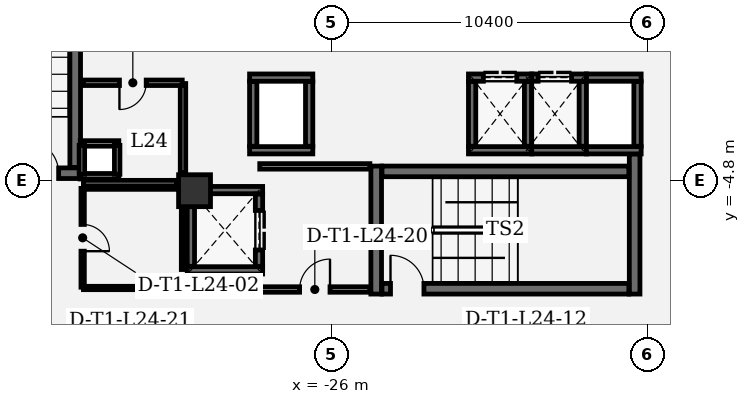
"""IFC4 building model, lengths in metres.
Left out: names, types, materials, properties, quantities, classifications, styles, units other than length and angle.
Written with IfcOpenShell. Run it as: python <this file> out.ifc"""

import sys

from ifc_helpers import new_model, si_unit, direction, frame, frame_2d, origin, origin_2d, place, context, subcontext, project, spatial, rectangle, extrude, element, fill, save


model = new_model("IFC4")
c1 = context("Model", 3, precision=1e-05, world=origin(), true_north=direction((0.0, 1.0)))
c2 = subcontext(c1, "Body", "Model", "MODEL_VIEW")
j1 = project(units=[si_unit("LENGTHUNIT", "METRE"), si_unit("PLANEANGLEUNIT", "RADIAN")], contexts=[c1])
p1 = place(None, origin())
s1 = spatial("IfcSite", under=j1, at=p1, CompositionType="ELEMENT")
p2 = place(p1, origin())
s2 = spatial("IfcBuilding", under=s1, at=p2, CompositionType="ELEMENT")
p3 = place(p2, frame((0.0, 0.0, 109.8)))
s3 = spatial("IfcBuildingStorey", under=s2, at=p3, CompositionType="ELEMENT", Elevation=109.8)
p4 = place(p3, frame((-30.5, -5.15, 0.0), z_axis=(0.0, 0.0, 1.0), x_axis=(1.0, 0.0, 0.0)))
e1 = element("IfcColumn", 1, at=p4, inside=s3, PredefinedType="COLUMN", context=c2, shape_type="SweptSolid", body=[
    extrude(rectangle(XDim=1.05, YDim=1.05, at=origin_2d()), origin(), (0.0, 0.0, 1.0), 4.05),
])
p5 = place(p3, frame((-24.525, -4.34, 0.0), z_axis=(0.0, 0.0, 1.0), x_axis=(0.0, -1.0, 0.0)))
e2 = element("IfcWall", 2, at=p5, inside=s3, PredefinedType="SHEAR", context=c2, shape_type="SweptSolid", body=[
    extrude(rectangle(XDim=4.21, YDim=0.35, at=frame_2d((2.105, 0.0))), origin(), (0.0, 0.0, 1.0), 3.77),
])
p6 = place(p3, frame((-16.025, -8.55, 0.0), z_axis=(0.0, 0.0, 1.0), x_axis=(0.0, 1.0, 0.0)))
e3 = element("IfcWall", 3, at=p6, inside=s3, PredefinedType="SHEAR", context=c2, shape_type="SweptSolid", body=[
    extrude(rectangle(XDim=4.61, YDim=0.35, at=frame_2d((2.305, 0.0))), origin(), (0.0, 0.0, 1.0), 3.77),
])
p7 = place(p3, frame((-24.335, -8.375, 0.0), z_axis=(0.0, 0.0, 1.0), x_axis=(1.0, 0.0, 0.0)))
e4 = element("IfcWall", 4, at=p7, inside=s3, PredefinedType="SHEAR", context=c2, shape_type="SweptSolid", body=[
    extrude(rectangle(XDim=8.12, YDim=0.35, at=frame_2d((4.06, 0.0))), origin(), (0.0, 0.0, 1.0), 3.77),
])
p8 = place(p7, frame((0.28, 0.0, 0.0)))
e5 = element("IfcOpeningElement", 5, at=p8, cuts=e4, PredefinedType="OPENING", context=c2, shape_type="SweptSolid", body=[
    extrude(rectangle(XDim=1.1, YDim=2.2, at=frame_2d((0.55, 1.1))), frame((0.0, 0.185, 0.0), z_axis=(0.0, -1.0, 0.0), x_axis=(1.0, 0.0, 0.0)), (0.0, 0.0, 1.0), 0.37),
])
p9 = place(p3, frame((-16.215, -4.515, 0.0), z_axis=(0.0, 0.0, 1.0), x_axis=(-1.0, 0.0, 0.0)))
e6 = element("IfcWall", 6, at=p9, inside=s3, PredefinedType="SHEAR", context=c2, shape_type="SweptSolid", body=[
    extrude(rectangle(XDim=8.12, YDim=0.35, at=frame_2d((4.06, 0.0))), origin(), (0.0, 0.0, 1.0), 3.77),
])
p10 = place(p3, frame((-38.46, -4.575, 0.0), z_axis=(0.0, 0.0, 1.0), x_axis=(1.0, 0.0, 0.0)))
e7 = element("IfcWall", 7, at=p10, inside=s3, PredefinedType="SHEAR", context=c2, shape_type="SweptSolid", body=[
    extrude(rectangle(XDim=4.21, YDim=0.35, at=frame_2d((2.105, 0.0))), origin(), (0.0, 0.0, 1.0), 3.77),
])
p11 = place(p10, frame((2.39, 0.0, 0.0)))
e8 = element("IfcOpeningElement", 8, at=p11, cuts=e7, PredefinedType="OPENING", context=c2, shape_type="SweptSolid", body=[
    extrude(rectangle(XDim=1.1, YDim=2.2, at=frame_2d((0.55, 1.1))), frame((0.0, 0.185, 0.0), z_axis=(0.0, -1.0, 0.0), x_axis=(1.0, 0.0, 0.0)), (0.0, 0.0, 1.0), 0.37),
])
p12 = place(p3, frame((-34.425, -4.385, 0.0), z_axis=(0.0, 0.0, 1.0), x_axis=(0.0, 1.0, 0.0)))
e9 = element("IfcWall", 9, at=p12, inside=s3, PredefinedType="SHEAR", context=c2, shape_type="SweptSolid", body=[
    extrude(rectangle(XDim=8.77, YDim=0.35, at=frame_2d((4.385, 0.0))), origin(), (0.0, 0.0, 1.0), 3.77),
])
for number, where, z_axis, x_axis in (
    (10, (-28.26, -7.77, 0.0), (0.0, 0.0, 1.0), (-1.0, 0.0, 0.0)),
    (11, (-30.74, -5.13, 0.0), (0.0, 0.0, 1.0), (1.0, 0.0, 0.0)),
):
    element("IfcWall", number, at=place(p3, frame(where, z_axis=z_axis, x_axis=x_axis)), inside=s3, PredefinedType="SHEAR", context=c2, shape_type="SweptSolid", body=[
        extrude(rectangle(XDim=2.48, YDim=0.24, at=frame_2d((1.24, 0.0))), origin(), (0.0, 0.0, 1.0), 3.77),
    ])
p13 = place(p3, frame((-30.62, -7.638, 0.0), z_axis=(0.0, 0.0, 1.0), x_axis=(0.0, 1.0, 0.0)))
e12 = element("IfcWall", 12, at=p13, inside=s3, PredefinedType="SHEAR", context=c2, shape_type="SweptSolid", body=[
    extrude(rectangle(XDim=2.376, YDim=0.24, at=frame_2d((1.188, 0.0))), origin(), (0.0, 0.0, 1.0), 3.77),
])
p14 = place(p3, frame((-28.38, -5.262, 0.0), z_axis=(0.0, 0.0, 1.0), x_axis=(0.0, -1.0, 0.0)))
e13 = element("IfcWall", 13, at=p14, inside=s3, PredefinedType="SHEAR", context=c2, shape_type="SweptSolid", body=[
    extrude(rectangle(XDim=2.376, YDim=0.24, at=frame_2d((1.188, 0.0))), origin(), (0.0, 0.0, 1.0), 3.77),
])
p15 = place(p14, frame((0.538, 0.0, 0.0)))
e14 = element("IfcOpeningElement", 14, at=p15, cuts=e13, PredefinedType="OPENING", context=c2, shape_type="SweptSolid", body=[
    extrude(rectangle(XDim=1.3, YDim=2.3, at=frame_2d((0.65, 1.15))), frame((0.0, 0.13, 0.0), z_axis=(0.0, -1.0, 0.0), x_axis=(1.0, 0.0, 0.0)), (0.0, 0.0, 1.0), 0.26),
])
for number, where, z_axis, x_axis in (
    (15, (-26.61, -3.82, 0.0), (0.0, 0.0, 1.0), (-1.0, 0.0, 0.0)),
    (16, (-28.69, -1.43, 0.0), (0.0, 0.0, 1.0), (1.0, 0.0, 0.0)),
):
    element("IfcWall", number, at=place(p3, frame(where, z_axis=z_axis, x_axis=x_axis)), inside=s3, PredefinedType="SHEAR", context=c2, shape_type="SweptSolid", body=[
        extrude(rectangle(XDim=2.08, YDim=0.24, at=frame_2d((1.04, 0.0))), origin(), (0.0, 0.0, 1.0), 3.77),
    ])
for number, where, z_axis, x_axis in (
    (17, (-28.57, -3.688, 0.0), (0.0, 0.0, 1.0), (0.0, 1.0, 0.0)),
    (18, (-26.73, -1.562, 0.0), (0.0, 0.0, 1.0), (0.0, -1.0, 0.0)),
):
    element("IfcWall", number, at=place(p3, frame(where, z_axis=z_axis, x_axis=x_axis)), inside=s3, PredefinedType="SHEAR", context=c2, shape_type="SweptSolid", body=[
        extrude(rectangle(XDim=2.126, YDim=0.24, at=frame_2d((1.063, 0.0))), origin(), (0.0, 0.0, 1.0), 3.77),
    ])
p16 = place(p3, frame((-19.41, -3.82, 0.0), z_axis=(0.0, 0.0, 1.0), x_axis=(-1.0, 0.0, 0.0)))
e19 = element("IfcWall", 19, at=p16, inside=s3, PredefinedType="SHEAR", context=c2, shape_type="SweptSolid", body=[
    extrude(rectangle(XDim=2.08, YDim=0.24, at=frame_2d((1.04, 0.0))), origin(), (0.0, 0.0, 1.0), 3.77),
])
p17 = place(p3, frame((-21.49, -1.43, 0.0), z_axis=(0.0, 0.0, 1.0), x_axis=(1.0, 0.0, 0.0)))
e20 = element("IfcWall", 20, at=p17, inside=s3, PredefinedType="SHEAR", context=c2, shape_type="SweptSolid", body=[
    extrude(rectangle(XDim=2.08, YDim=0.24, at=frame_2d((1.04, 0.0))), origin(), (0.0, 0.0, 1.0), 3.77),
])
p18 = place(p17, frame((0.49, 0.0, 0.0)))
e21 = element("IfcOpeningElement", 21, at=p18, cuts=e20, PredefinedType="OPENING", context=c2, shape_type="SweptSolid", body=[
    extrude(rectangle(XDim=1.1, YDim=2.2, at=frame_2d((0.55, 1.1))), frame((0.0, 0.13, 0.0), z_axis=(0.0, -1.0, 0.0), x_axis=(1.0, 0.0, 0.0)), (0.0, 0.0, 1.0), 0.26),
])
for number, where, z_axis, x_axis in (
    (22, (-21.37, -3.688, 0.0), (0.0, 0.0, 1.0), (0.0, 1.0, 0.0)),
    (23, (-19.53, -1.562, 0.0), (0.0, 0.0, 1.0), (0.0, -1.0, 0.0)),
):
    element("IfcWall", number, at=place(p3, frame(where, z_axis=z_axis, x_axis=x_axis)), inside=s3, PredefinedType="SHEAR", context=c2, shape_type="SweptSolid", body=[
        extrude(rectangle(XDim=2.126, YDim=0.24, at=frame_2d((1.063, 0.0))), origin(), (0.0, 0.0, 1.0), 3.77),
    ])
p19 = place(p3, frame((-17.61, -3.82, 0.0), z_axis=(0.0, 0.0, 1.0), x_axis=(-1.0, 0.0, 0.0)))
e24 = element("IfcWall", 24, at=p19, inside=s3, PredefinedType="SHEAR", context=c2, shape_type="SweptSolid", body=[
    extrude(rectangle(XDim=1.8, YDim=0.24, at=frame_2d((0.9, 0.0))), origin(), (0.0, 0.0, 1.0), 3.77),
])
p20 = place(p3, frame((-19.41, -1.43, 0.0), z_axis=(0.0, 0.0, 1.0), x_axis=(1.0, 0.0, 0.0)))
e25 = element("IfcWall", 25, at=p20, inside=s3, PredefinedType="SHEAR", context=c2, shape_type="SweptSolid", body=[
    extrude(rectangle(XDim=1.8, YDim=0.24, at=frame_2d((0.9, 0.0))), origin(), (0.0, 0.0, 1.0), 3.77),
])
p21 = place(p20, frame((0.21, 0.0, 0.0)))
e26 = element("IfcOpeningElement", 26, at=p21, cuts=e25, PredefinedType="OPENING", context=c2, shape_type="SweptSolid", body=[
    extrude(rectangle(XDim=1.1, YDim=2.2, at=frame_2d((0.55, 1.1))), frame((0.0, 0.13, 0.0), z_axis=(0.0, -1.0, 0.0), x_axis=(1.0, 0.0, 0.0)), (0.0, 0.0, 1.0), 0.26),
])
p22 = place(p3, frame((-17.73, -1.562, 0.0), z_axis=(0.0, 0.0, 1.0), x_axis=(0.0, -1.0, 0.0)))
e27 = element("IfcWall", 27, at=p22, inside=s3, PredefinedType="SHEAR", context=c2, shape_type="SweptSolid", body=[
    extrude(rectangle(XDim=2.126, YDim=0.24, at=frame_2d((1.063, 0.0))), origin(), (0.0, 0.0, 1.0), 3.77),
])
for number, where, z_axis, x_axis in (
    (28, (-15.81, -3.82, 0.0), (0.0, 0.0, 1.0), (-1.0, 0.0, 0.0)),
    (29, (-17.61, -1.43, 0.0), (0.0, 0.0, 1.0), (1.0, 0.0, 0.0)),
):
    element("IfcWall", number, at=place(p3, frame(where, z_axis=z_axis, x_axis=x_axis)), inside=s3, PredefinedType="SHEAR", context=c2, shape_type="SweptSolid", body=[
        extrude(rectangle(XDim=1.8, YDim=0.24, at=frame_2d((0.9, 0.0))), origin(), (0.0, 0.0, 1.0), 3.77),
    ])
p23 = place(p3, frame((-15.93, -1.562, 0.0), z_axis=(0.0, 0.0, 1.0), x_axis=(0.0, -1.0, 0.0)))
e30 = element("IfcWall", 30, at=p23, inside=s3, PredefinedType="SHEAR", context=c2, shape_type="SweptSolid", body=[
    extrude(rectangle(XDim=2.126, YDim=0.24, at=frame_2d((1.063, 0.0))), origin(), (0.0, 0.0, 1.0), 3.77),
])
for number, where, z_axis, x_axis in (
    (31, (-32.99, -4.675, 0.0), (0.0, 0.0, 1.0), (-1.0, 0.0, 0.0)),
    (32, (-34.26, -3.595, 0.0), (0.0, 0.0, 1.0), (1.0, 0.0, 0.0)),
):
    element("IfcWall", number, at=place(p3, frame(where, z_axis=z_axis, x_axis=x_axis)), inside=s3, PredefinedType="PARTITIONING", context=c2, shape_type="SweptSolid", body=[
        extrude(rectangle(XDim=1.27, YDim=0.18, at=frame_2d((0.635, 0.0))), origin(), (0.0, 0.0, 1.0), 3.77),
    ])
for number, where, z_axis, x_axis in (
    (33, (-34.205, -4.61, 0.0), (0.0, 0.0, 1.0), (0.0, 1.0, 0.0)),
    (34, (-33.045, -3.66, 0.0), (0.0, 0.0, 1.0), (0.0, -1.0, 0.0)),
):
    element("IfcWall", number, at=place(p3, frame(where, z_axis=z_axis, x_axis=x_axis)), inside=s3, PredefinedType="PARTITIONING", context=c2, shape_type="SweptSolid", body=[
        extrude(rectangle(XDim=0.95, YDim=0.18, at=frame_2d((0.475, 0.0))), origin(), (0.0, 0.0, 1.0), 3.77),
    ])
p24 = place(p3, frame((-28.355, -8.4, 0.0), z_axis=(0.0, 0.0, 1.0), x_axis=(1.0, 0.0, 0.0)))
e35 = element("IfcWall", 35, at=p24, inside=s3, PredefinedType="PARTITIONING", context=c2, shape_type="SweptSolid", body=[
    extrude(rectangle(XDim=3.622, YDim=0.18, at=frame_2d((1.811, 0.0))), origin(), (0.0, 0.0, 1.0), 3.77),
])
p25 = place(p24, frame((1.311, 0.0, 0.0)))
e36 = element("IfcOpeningElement", 36, at=p25, cuts=e35, PredefinedType="OPENING", context=c2, shape_type="SweptSolid", body=[
    extrude(rectangle(XDim=1.0, YDim=2.15, at=frame_2d((0.5, 1.075))), frame((0.0, 0.1, 0.0), z_axis=(0.0, -1.0, 0.0), x_axis=(1.0, 0.0, 0.0)), (0.0, 0.0, 1.0), 0.2),
])
p26 = place(p3, frame((-24.733, -4.35, 0.0), z_axis=(0.0, 0.0, 1.0), x_axis=(-1.0, 0.0, 0.0)))
e37 = element("IfcWall", 37, at=p26, inside=s3, PredefinedType="PARTITIONING", context=c2, shape_type="SweptSolid", body=[
    extrude(rectangle(XDim=3.622, YDim=0.18, at=frame_2d((1.811, 0.0))), origin(), (0.0, 0.0, 1.0), 3.77),
])
p27 = place(p3, frame((-34.155, -8.35, 0.0), z_axis=(0.0, 0.0, 1.0), x_axis=(1.0, 0.0, 0.0)))
e38 = element("IfcWall", 38, at=p27, inside=s3, PredefinedType="PARTITIONING", context=c2, shape_type="SweptSolid", body=[
    extrude(rectangle(XDim=3.25, YDim=0.11, at=frame_2d((1.625, 0.0))), origin(), (0.0, 0.0, 1.0), 3.77),
])
p28 = place(p3, frame((-30.88, -7.743, 0.0), z_axis=(0.0, 0.0, 1.0), x_axis=(0.0, 1.0, 0.0)))
e39 = element("IfcWall", 39, at=p28, inside=s3, PredefinedType="PARTITIONING", context=c2, shape_type="SweptSolid", body=[
    extrude(rectangle(XDim=2.003, YDim=0.11, at=frame_2d((1.001, 0.0))), origin(), (0.0, 0.0, 1.0), 3.77),
])
p29 = place(p3, frame((-31.09, -5.05, 0.0), z_axis=(0.0, 0.0, 1.0), x_axis=(-1.0, 0.0, 0.0)))
e40 = element("IfcWall", 40, at=p29, inside=s3, PredefinedType="PARTITIONING", context=c2, shape_type="SweptSolid", body=[
    extrude(rectangle(XDim=3.065, YDim=0.11, at=frame_2d((1.532, 0.0))), origin(), (0.0, 0.0, 1.0), 3.77),
])
p30 = place(p3, frame((-34.18, -5.075, 0.0), z_axis=(0.0, 0.0, 1.0), x_axis=(0.0, -1.0, 0.0)))
e41 = element("IfcWall", 41, at=p30, inside=s3, PredefinedType="PARTITIONING", context=c2, shape_type="SweptSolid", body=[
    extrude(rectangle(XDim=3.25, YDim=0.11, at=frame_2d((1.625, 0.0))), origin(), (0.0, 0.0, 1.0), 3.77),
])
p31 = place(p30, frame((1.185, 0.0, 0.0)))
e42 = element("IfcOpeningElement", 42, at=p31, cuts=e41, PredefinedType="OPENING", context=c2, shape_type="SweptSolid", body=[
    extrude(rectangle(XDim=0.88, YDim=2.1, at=frame_2d((0.44, 1.05))), frame((0.0, 0.065, 0.0), z_axis=(0.0, -1.0, 0.0), x_axis=(1.0, 0.0, 0.0)), (0.0, 0.0, 1.0), 0.13),
])
p32 = place(p3, frame((-34.155, -4.9, 0.0), z_axis=(0.0, 0.0, 1.0), x_axis=(1.0, 0.0, 0.0)))
e43 = element("IfcWall", 43, at=p32, inside=s3, PredefinedType="PARTITIONING", context=c2, shape_type="SweptSolid", body=[
    extrude(rectangle(XDim=3.065, YDim=0.18, at=frame_2d((1.532, 0.0))), origin(), (0.0, 0.0, 1.0), 3.77),
])
p33 = place(p3, frame((-30.88, -4.56, 0.0), z_axis=(0.0, 0.0, 1.0), x_axis=(0.0, 1.0, 0.0)))
e44 = element("IfcWall", 44, at=p33, inside=s3, PredefinedType="PARTITIONING", context=c2, shape_type="SweptSolid", body=[
    extrude(rectangle(XDim=2.935, YDim=0.18, at=frame_2d((1.468, 0.0))), origin(), (0.0, 0.0, 1.0), 3.77),
])
p34 = place(p3, frame((-30.905, -1.6, 0.0), z_axis=(0.0, 0.0, 1.0), x_axis=(-1.0, 0.0, 0.0)))
e45 = element("IfcWall", 45, at=p34, inside=s3, PredefinedType="PARTITIONING", context=c2, shape_type="SweptSolid", body=[
    extrude(rectangle(XDim=3.25, YDim=0.18, at=frame_2d((1.625, 0.0))), origin(), (0.0, 0.0, 1.0), 3.77),
])
p35 = place(p34, frame((1.185, 0.0, 0.0)))
e46 = element("IfcOpeningElement", 46, at=p35, cuts=e45, PredefinedType="OPENING", context=c2, shape_type="SweptSolid", body=[
    extrude(rectangle(XDim=0.88, YDim=2.1, at=frame_2d((0.44, 1.05))), frame((0.0, 0.1, 0.0), z_axis=(0.0, -1.0, 0.0), x_axis=(1.0, 0.0, 0.0)), (0.0, 0.0, 1.0), 0.2),
])
p36 = place(p8, origin())
e47 = element("IfcDoor", 47, at=p36, inside=s3, OperationType="SINGLE_SWING_LEFT", PredefinedType="DOOR", context=c2, shape_type="SweptSolid", body=[
    extrude(rectangle(XDim=1.1, YDim=2.2, at=frame_2d((0.55, 1.1))), frame((0.0, 0.025, 0.0), z_axis=(0.0, -1.0, 0.0), x_axis=(1.0, 0.0, 0.0)), (0.0, 0.0, 1.0), 0.05),
])
fill(e5, e47)
p37 = place(p11, origin())
e48 = element("IfcDoor", 48, at=p37, inside=s3, OperationType="SINGLE_SWING_LEFT", PredefinedType="DOOR", context=c2, shape_type="SweptSolid", body=[
    extrude(rectangle(XDim=1.1, YDim=2.2, at=frame_2d((0.55, 1.1))), frame((0.0, 0.025, 0.0), z_axis=(0.0, -1.0, 0.0), x_axis=(1.0, 0.0, 0.0)), (0.0, 0.0, 1.0), 0.05),
])
fill(e8, e48)
p38 = place(p15, origin())
e49 = element("IfcDoor", 49, at=p38, inside=s3, OperationType="DOUBLE_DOOR_SLIDING", PredefinedType="DOOR", context=c2, shape_type="SweptSolid", body=[
    extrude(rectangle(XDim=1.3, YDim=2.3, at=frame_2d((0.65, 1.15))), frame((0.0, 0.025, 0.0), z_axis=(0.0, -1.0, 0.0), x_axis=(1.0, 0.0, 0.0)), (0.0, 0.0, 1.0), 0.05),
])
fill(e14, e49)
p39 = place(p18, origin())
e50 = element("IfcDoor", 50, at=p39, inside=s3, OperationType="DOUBLE_DOOR_SLIDING", PredefinedType="DOOR", context=c2, shape_type="SweptSolid", body=[
    extrude(rectangle(XDim=1.1, YDim=2.2, at=frame_2d((0.55, 1.1))), frame((0.0, 0.025, 0.0), z_axis=(0.0, -1.0, 0.0), x_axis=(1.0, 0.0, 0.0)), (0.0, 0.0, 1.0), 0.05),
])
fill(e21, e50)
p40 = place(p21, origin())
e51 = element("IfcDoor", 51, at=p40, inside=s3, OperationType="DOUBLE_DOOR_SLIDING", PredefinedType="DOOR", context=c2, shape_type="SweptSolid", body=[
    extrude(rectangle(XDim=1.1, YDim=2.2, at=frame_2d((0.55, 1.1))), frame((0.0, 0.025, 0.0), z_axis=(0.0, -1.0, 0.0), x_axis=(1.0, 0.0, 0.0)), (0.0, 0.0, 1.0), 0.05),
])
fill(e26, e51)
p41 = place(p31, origin())
e52 = element("IfcDoor", 52, at=p41, inside=s3, OperationType="SINGLE_SWING_RIGHT", PredefinedType="DOOR", context=c2, shape_type="SweptSolid", body=[
    extrude(rectangle(XDim=0.88, YDim=2.1, at=frame_2d((0.44, 1.05))), frame((0.0, 0.025, 0.0), z_axis=(0.0, -1.0, 0.0), x_axis=(1.0, 0.0, 0.0)), (0.0, 0.0, 1.0), 0.05),
])
fill(e42, e52)
p42 = place(p35, origin())
e53 = element("IfcDoor", 53, at=p42, inside=s3, OperationType="SINGLE_SWING_RIGHT", PredefinedType="DOOR", context=c2, shape_type="SweptSolid", body=[
    extrude(rectangle(XDim=0.88, YDim=2.1, at=frame_2d((0.44, 1.05))), frame((0.0, 0.025, 0.0), z_axis=(0.0, -1.0, 0.0), x_axis=(1.0, 0.0, 0.0)), (0.0, 0.0, 1.0), 0.05),
])
fill(e46, e53)
p43 = place(p25, origin())
e54 = element("IfcDoor", 54, at=p43, inside=s3, OperationType="SINGLE_SWING_RIGHT", PredefinedType="DOOR", context=c2, shape_type="SweptSolid", body=[
    extrude(rectangle(XDim=1.0, YDim=2.15, at=frame_2d((0.5, 1.075))), frame((0.0, 0.025, 0.0), z_axis=(0.0, -1.0, 0.0), x_axis=(1.0, 0.0, 0.0)), (0.0, 0.0, 1.0), 0.05),
])
fill(e36, e54)
save(model, sys.argv[1])
